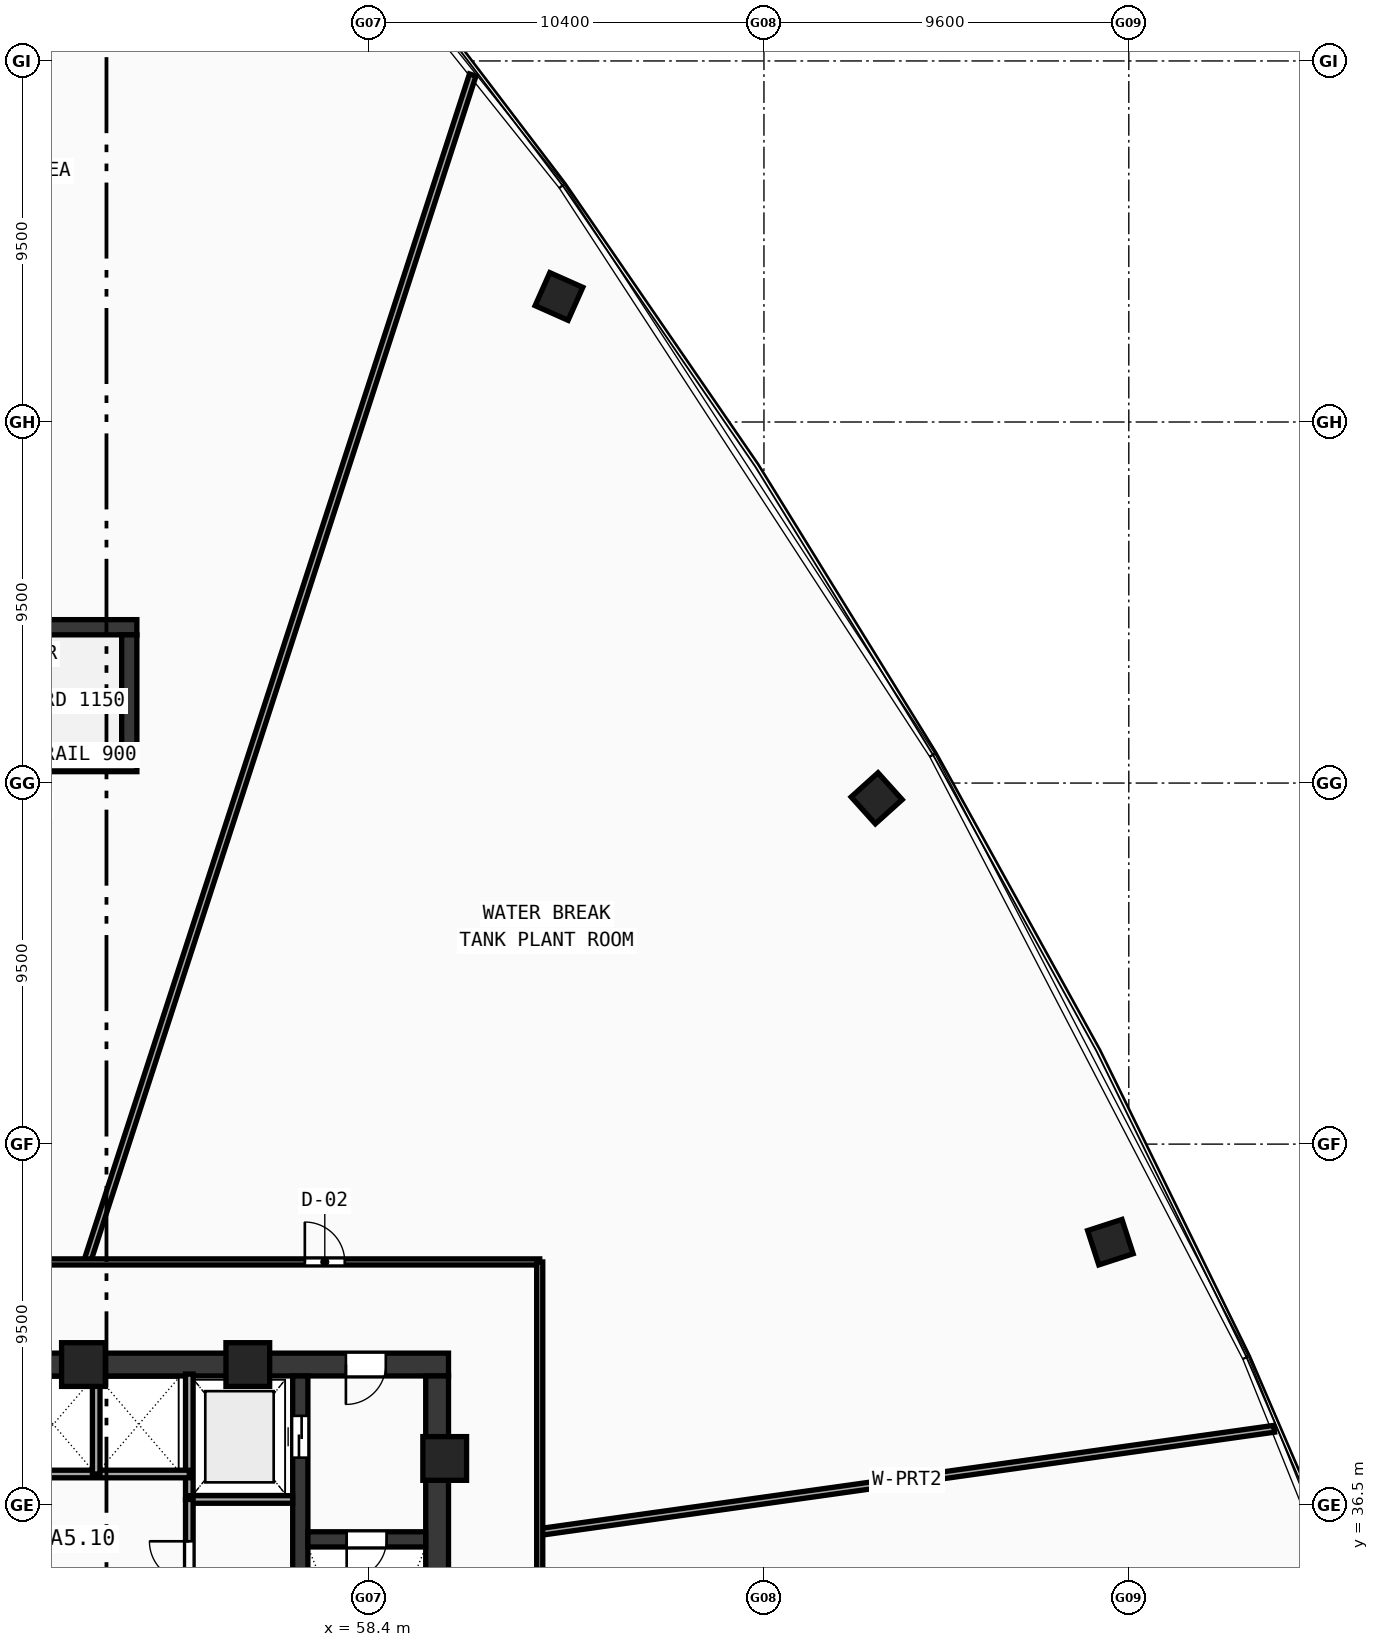
"""IFC4 building model, lengths in metres.
Left out: names, types, materials, properties, quantities, classifications, styles, units other than length and angle.
Written with IfcOpenShell. Run it as: python <this file> out.ifc"""

import sys

from ifc_helpers import new_model, si_unit, direction, frame, frame_2d, origin, origin_with_axes, origin_2d, place, context, subcontext, project, spatial, rectangle, hollow_rectangle, extrude, source, transform, mapped, element, fill, save


model = new_model("IFC4")
c1 = context("Model", 3, precision=1e-05, world=origin(), true_north=direction((0.0, 1.0)))
c2 = subcontext(c1, "Body", "Model", "MODEL_VIEW")
j1 = project(units=[si_unit("LENGTHUNIT", "METRE"), si_unit("PLANEANGLEUNIT", "RADIAN")], contexts=[c1])
p1 = place(None, origin())
s1 = spatial("IfcSite", under=j1, at=p1, CompositionType="ELEMENT")
p2 = place(p1, origin())
s2 = spatial("IfcBuilding", under=s1, at=p2, CompositionType="ELEMENT")
p3 = place(p2, frame((0.0, 0.0, 125.03)))
s3 = spatial("IfcBuildingStorey", under=s2, at=p3, CompositionType="ELEMENT", Elevation=125.03)
p4 = place(p3, frame((49.2, 40.2, 0.0), z_axis=(0.0, 0.0, 1.0), x_axis=(1.0, 0.0, 0.0)))
e1 = element("IfcWall", 1, at=p4, inside=s3, PredefinedType="SHEAR", context=c2, shape_type="SweptSolid", body=[
    extrude(rectangle(XDim=11.3, YDim=0.6, at=frame_2d((5.65, 0.0))), origin(), (0.0, 0.0, 1.0), 4.54),
])
p5 = place(p4, frame((8.6, 0.0, 0.0)))
e2 = element("IfcOpeningElement", 2, at=p5, cuts=e1, PredefinedType="OPENING", context=c2, shape_type="SweptSolid", body=[
    extrude(rectangle(XDim=1.05, YDim=2.1, at=frame_2d((0.525, 1.05))), frame((0.0, 0.31, 0.0), z_axis=(0.0, -1.0, 0.0), x_axis=(1.0, 0.0, 0.0)), (0.0, 0.0, 1.0), 0.62),
])
p6 = place(p3, frame((60.2, 27.8, 0.0), z_axis=(0.0, 0.0, 1.0), x_axis=(0.0, 1.0, 0.0)))
e3 = element("IfcWall", 3, at=p6, inside=s3, PredefinedType="SHEAR", context=c2, shape_type="SweptSolid", body=[
    extrude(rectangle(XDim=12.1, YDim=0.6, at=frame_2d((6.05, 0.0))), origin(), (0.0, 0.0, 1.0), 4.54),
])
p7 = place(p3, frame((56.6, 27.8, 0.0), z_axis=(0.0, 0.0, 1.0), x_axis=(0.0, 1.0, 0.0)))
e4 = element("IfcWall", 4, at=p7, inside=s3, PredefinedType="SHEAR", context=c2, shape_type="SweptSolid", body=[
    extrude(rectangle(XDim=12.1, YDim=0.4, at=frame_2d((6.05, 0.0))), origin(), (0.0, 0.0, 1.0), 4.54),
])
p8 = place(p7, frame((9.95, 0.0, 0.0)))
e5 = element("IfcOpeningElement", 5, at=p8, cuts=e4, PredefinedType="OPENING", context=c2, shape_type="SweptSolid", body=[
    extrude(rectangle(XDim=1.1, YDim=2.1, at=frame_2d((0.55, 1.05))), frame((0.0, 0.21, 0.0), z_axis=(0.0, -1.0, 0.0), x_axis=(1.0, 0.0, 0.0)), (0.0, 0.0, 1.0), 0.42),
])
p9 = place(p3, frame((56.8, 35.6, 0.0), z_axis=(0.0, 0.0, 1.0), x_axis=(1.0, 0.0, 0.0)))
e6 = element("IfcWall", 6, at=p9, inside=s3, PredefinedType="SHEAR", context=c2, shape_type="SweptSolid", body=[
    extrude(rectangle(XDim=3.1, YDim=0.4, at=frame_2d((1.55, 0.0))), origin(), (0.0, 0.0, 1.0), 4.54),
])
p10 = place(p9, frame((1.02, 0.0, 0.0)))
e7 = element("IfcOpeningElement", 7, at=p10, cuts=e6, PredefinedType="OPENING", context=c2, shape_type="SweptSolid", body=[
    extrude(rectangle(XDim=1.05, YDim=2.1, at=frame_2d((0.525, 1.05))), frame((0.0, 0.21, 0.0), z_axis=(0.0, -1.0, 0.0), x_axis=(1.0, 0.0, 0.0)), (0.0, 0.0, 1.0), 0.42),
])
p11 = place(p3, frame((43.8, 59.6, 0.0), z_axis=(0.0, 0.0, 1.0), x_axis=(1.0, 0.0, 0.0)))
e8 = element("IfcWall", 8, at=p11, inside=s3, PredefinedType="SHEAR", context=c2, shape_type="SweptSolid", body=[
    extrude(rectangle(XDim=8.5, YDim=0.4, at=frame_2d((4.25, 0.0))), origin(), (0.0, 0.0, 1.0), 4.54),
])
p12 = place(p3, frame((43.8, 56.0, 0.0), z_axis=(0.0, 0.0, 1.0), x_axis=(1.0, 0.0, 0.0)))
e9 = element("IfcWall", 9, at=p12, inside=s3, PredefinedType="SHEAR", context=c2, shape_type="SweptSolid", body=[
    extrude(rectangle(XDim=8.5, YDim=0.4, at=frame_2d((4.25, 0.0))), origin(), (0.0, 0.0, 1.0), 4.54),
])
p13 = place(p12, frame((0.62, 0.0, 0.0)))
e10 = element("IfcOpeningElement", 10, at=p13, cuts=e9, PredefinedType="OPENING", context=c2, shape_type="SweptSolid", body=[
    extrude(rectangle(XDim=1.05, YDim=2.1, at=frame_2d((0.525, 1.05))), frame((0.0, 0.21, 0.0), z_axis=(0.0, -1.0, 0.0), x_axis=(1.0, 0.0, 0.0)), (0.0, 0.0, 1.0), 0.42),
])
p14 = place(p3, frame((52.1, 56.2, 0.0), z_axis=(0.0, 0.0, 1.0), x_axis=(0.0, 1.0, 0.0)))
e11 = element("IfcWall", 11, at=p14, inside=s3, PredefinedType="SHEAR", context=c2, shape_type="SweptSolid", body=[
    extrude(rectangle(XDim=3.2, YDim=0.4, at=frame_2d((1.6, 0.0))), origin(), (0.0, 0.0, 1.0), 4.54),
])
m1 = source(origin(), c2, "Body", "SweptSolid", [
    extrude(hollow_rectangle(XDim=1.15, YDim=1.15, WallThickness=0.048, at=origin_2d()), origin(), (0.0, 0.0, 1.0), 4.82),
])
for number, where, z_axis, x_axis in (
    (12, (60.4, 37.729, -0.28), (0.0, 0.0, 1.0), (1.0, 0.0, 0.0)),
    (13, (55.219, 40.2, -0.28), (0.0, 0.0, 1.0), (1.0, 0.0, 0.0)),
    (14, (50.894, 40.2, -0.28), (0.0, 0.0, 1.0), (1.0, 0.0, 0.0)),
):
    element("IfcColumn", number, at=place(p3, frame(where, z_axis=z_axis, x_axis=x_axis)), inside=s3, PredefinedType="COLUMN", context=c2, shape_type="MappedRepresentation", body=[
        mapped(m1, transform((0.0, 0.0, 0.0), scale=1.0)),
    ])
m2 = source(origin(), c2, "Body", "SweptSolid", [
    extrude(hollow_rectangle(XDim=0.95, YDim=0.95, WallThickness=0.04, at=origin_2d()), origin(), (0.0, 0.0, 1.0), 4.82),
])
for number, where, z_axis, x_axis in (
    (15, (77.915, 43.42, -0.28), (0.0, 0.0, 1.0), (-0.309, 0.951, 0.0)),
    (16, (71.766, 55.099, -0.28), (0.0, 0.0, 1.0), (-0.669, 0.743, 0.0)),
    (17, (63.406, 68.303, -0.28), (0.0, 0.0, 1.0), (-0.914, 0.407, 0.0)),
):
    element("IfcColumn", number, at=place(p3, frame(where, z_axis=z_axis, x_axis=x_axis)), inside=s3, PredefinedType="COLUMN", context=c2, shape_type="MappedRepresentation", body=[
        mapped(m2, transform((0.0, 0.0, 0.0), scale=1.0)),
    ])
p15 = place(p3, frame((53.68, 36.65, 0.0), z_axis=(0.0, 0.0, 1.0), x_axis=(0.0, 1.0, 0.0)))
e18 = element("IfcWall", 18, at=p15, inside=s3, PredefinedType="SOLIDWALL", context=c2, shape_type="SweptSolid", body=[
    extrude(rectangle(XDim=3.3, YDim=0.2, at=frame_2d((1.65, 0.0))), origin(), (0.0, 0.0, 1.0), 4.54),
])
p16 = place(p3, frame((53.68, 36.65, 0.0), z_axis=(0.0, 0.0, 1.0), x_axis=(1.0, 0.0, 0.0)))
e19 = element("IfcWall", 19, at=p16, inside=s3, PredefinedType="SOLIDWALL", context=c2, shape_type="SweptSolid", body=[
    extrude(rectangle(XDim=2.72, YDim=0.2, at=frame_2d((1.36, 0.0))), origin(), (0.0, 0.0, 1.0), 4.54),
])
p17 = place(p3, frame((48.95, 37.32, 0.0), z_axis=(0.0, 0.0, 1.0), x_axis=(1.0, 0.0, 0.0)))
e20 = element("IfcWall", 20, at=p17, inside=s3, PredefinedType="SOLIDWALL", context=c2, shape_type="SweptSolid", body=[
    extrude(rectangle(XDim=4.73, YDim=0.2, at=frame_2d((2.365, 0.0))), origin(), (0.0, 0.0, 1.0), 4.54),
])
p18 = place(p3, frame((51.23, 37.32, 0.0), z_axis=(0.0, 0.0, 1.0), x_axis=(0.0, 1.0, 0.0)))
e21 = element("IfcWall", 21, at=p18, inside=s3, PredefinedType="SOLIDWALL", context=c2, shape_type="SweptSolid", body=[
    extrude(rectangle(XDim=2.63, YDim=0.2, at=frame_2d((1.315, 0.0))), origin(), (0.0, 0.0, 1.0), 4.54),
])
p19 = place(p3, frame((53.68, 27.6, 0.0), z_axis=(0.0, 0.0, 1.0), x_axis=(0.0, 1.0, 0.0)))
e22 = element("IfcWall", 22, at=p19, inside=s3, PredefinedType="SOLIDWALL", context=c2, shape_type="SweptSolid", body=[
    extrude(rectangle(XDim=9.05, YDim=0.2, at=frame_2d((4.525, 0.0))), origin(), (0.0, 0.0, 1.0), 4.54),
])
p20 = place(p19, frame((6.9, 0.0, 0.0)))
e23 = element("IfcOpeningElement", 23, at=p20, cuts=e22, PredefinedType="OPENING", context=c2, shape_type="SweptSolid", body=[
    extrude(rectangle(XDim=1.05, YDim=2.1, at=frame_2d((0.525, 1.05))), frame((0.0, 0.11, 0.0), z_axis=(0.0, -1.0, 0.0), x_axis=(1.0, 0.0, 0.0)), (0.0, 0.0, 1.0), 0.22),
])
p21 = place(p3, frame((62.9, 35.794, 0.0), z_axis=(0.0, 0.0, 1.0), x_axis=(0.990268733373, 0.13916837178, 0.0)))
e24 = element("IfcWall", 24, at=p21, inside=s3, PredefinedType="PARTITIONING", context=c2, shape_type="SweptSolid", body=[
    extrude(rectangle(XDim=19.513, YDim=0.18, at=frame_2d((9.756, 0.0))), origin(), (0.0, 0.0, 1.0), 3.89),
])
p22 = place(p3, frame((50.989, 42.9, 0.0), z_axis=(0.0, 0.0, 1.0), x_axis=(0.309014626383, 0.951057285699, 0.0)))
e25 = element("IfcWall", 25, at=p22, inside=s3, PredefinedType="PARTITIONING", context=c2, shape_type="SweptSolid", body=[
    extrude(rectangle(XDim=32.839, YDim=0.18, at=frame_2d((16.419, 0.0))), origin(), (0.0, 0.0, 1.0), 3.89),
])
p23 = place(p3, frame((45.85, 42.9, 0.0), z_axis=(0.0, 0.0, 1.0), x_axis=(1.0, 0.0, 0.0)))
e26 = element("IfcWall", 26, at=p23, inside=s3, PredefinedType="PARTITIONING", context=c2, shape_type="SweptSolid", body=[
    extrude(rectangle(XDim=17.05, YDim=0.16, at=frame_2d((8.525, 0.0))), origin(), (0.0, 0.0, 1.0), 3.89),
])
p24 = place(p23, frame((10.87, 0.0, 0.0)))
e27 = element("IfcOpeningElement", 27, at=p24, cuts=e26, PredefinedType="OPENING", context=c2, shape_type="SweptSolid", body=[
    extrude(rectangle(XDim=1.05, YDim=2.1, at=frame_2d((0.525, 1.05))), frame((0.0, 0.09, 0.0), z_axis=(0.0, -1.0, 0.0), x_axis=(1.0, 0.0, 0.0)), (0.0, 0.0, 1.0), 0.18),
])
p25 = place(p3, frame((62.9, 42.9, 0.0), z_axis=(0.0, 0.0, 1.0), x_axis=(0.0, -1.0, 0.0)))
e28 = element("IfcWall", 28, at=p25, inside=s3, PredefinedType="PARTITIONING", context=c2, shape_type="SweptSolid", body=[
    extrude(rectangle(XDim=18.0, YDim=0.16, at=frame_2d((9.0, 0.0))), origin(), (0.0, 0.0, 1.0), 3.89),
])
p26 = place(p25, frame((12.328, 0.0, 0.0)))
e29 = element("IfcOpeningElement", 29, at=p26, cuts=e28, PredefinedType="OPENING", context=c2, shape_type="SweptSolid", body=[
    extrude(rectangle(XDim=1.05, YDim=2.1, at=frame_2d((0.525, 1.05))), frame((0.0, 0.09, 0.0), z_axis=(0.0, -1.0, 0.0), x_axis=(1.0, 0.0, 0.0)), (0.0, 0.0, 1.0), 0.18),
])
m3 = source(origin(), c2, "Body", "SweptSolid", [
    extrude(rectangle(XDim=1.05, YDim=2.1, at=frame_2d((0.525, 1.05))), frame((0.0, 0.025, 0.0), z_axis=(0.0, -1.0, 0.0), x_axis=(1.0, 0.0, 0.0)), (0.0, 0.0, 1.0), 0.05),
])
p27 = place(p10, frame((1.05, 0.0, 0.0), z_axis=(0.0, 0.0, 1.0), x_axis=(-1.0, 0.0, 0.0)))
e30 = element("IfcDoor", 30, at=p27, inside=s3, OperationType="SINGLE_SWING_RIGHT", PredefinedType="DOOR", context=c2, shape_type="MappedRepresentation", body=[
    mapped(m3, transform((0.0, 0.0, 0.0), scale=1.0)),
])
fill(e7, e30)
p28 = place(p5, frame((1.05, 0.0, 0.0), z_axis=(0.0, 0.0, 1.0), x_axis=(-1.0, 0.0, 0.0)))
e31 = element("IfcDoor", 31, at=p28, inside=s3, OperationType="SINGLE_SWING_RIGHT", PredefinedType="DOOR", context=c2, shape_type="MappedRepresentation", body=[
    mapped(m3, transform((0.0, 0.0, 0.0), scale=1.0)),
])
fill(e2, e31)
m4 = source(origin(), c2, "Body", "SweptSolid", [
    extrude(rectangle(XDim=1.1, YDim=2.1, at=frame_2d((0.55, 1.05))), frame((0.0, 0.025, 0.0), z_axis=(0.0, -1.0, 0.0), x_axis=(1.0, 0.0, 0.0)), (0.0, 0.0, 1.0), 0.05),
])
p29 = place(p8, origin_with_axes())
e32 = element("IfcDoor", 32, at=p29, inside=s3, OperationType="DOUBLE_DOOR_SLIDING", PredefinedType="DOOR", context=c2, shape_type="MappedRepresentation", body=[
    mapped(m4, transform((0.0, 0.0, 0.0), scale=1.0)),
])
fill(e5, e32)
p30 = place(p20, origin_with_axes())
e33 = element("IfcDoor", 33, at=p30, inside=s3, OperationType="SINGLE_SWING_RIGHT", PredefinedType="DOOR", context=c2, shape_type="MappedRepresentation", body=[
    mapped(m3, transform((0.0, 0.0, 0.0), scale=1.0)),
])
fill(e23, e33)
p31 = place(p24, origin_with_axes())
e34 = element("IfcDoor", 34, at=p31, inside=s3, OperationType="SINGLE_SWING_LEFT", PredefinedType="DOOR", context=c2, shape_type="MappedRepresentation", body=[
    mapped(m3, transform((0.0, 0.0, 0.0), scale=1.0)),
])
fill(e27, e34)
save(model, sys.argv[1])
